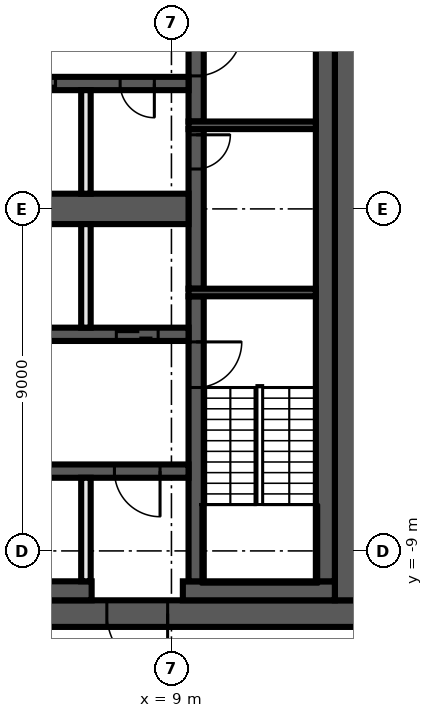
"""IFC4 building model, lengths in metres.
Left out: names, types, materials, properties, quantities, classifications, styles, units other than length and angle.
Written with IfcOpenShell. Run it as: python <this file> out.ifc"""

import sys

from ifc_helpers import new_model, si_unit, direction, frame, frame_2d, origin, place, context, subcontext, project, spatial, rectangle, extrude, element, fill, save


model = new_model("IFC4")
c1 = context("Model", 3, precision=1e-05, world=origin(), true_north=direction((0.0, 1.0)))
c2 = subcontext(c1, "Body", "Model", "MODEL_VIEW")
j1 = project(units=[si_unit("LENGTHUNIT", "METRE"), si_unit("PLANEANGLEUNIT", "RADIAN")], contexts=[c1])
p1 = place(None, origin())
s1 = spatial("IfcSite", under=j1, at=p1, CompositionType="ELEMENT")
p2 = place(p1, origin())
s2 = spatial("IfcBuilding", under=s1, at=p2, CompositionType="ELEMENT")
p3 = place(p2, frame((0.0, 0.0, 245.4)))
s3 = spatial("IfcBuildingStorey", under=s2, at=p3, CompositionType="ELEMENT", Elevation=245.4)
p4 = place(p3, frame((14.0, -10.65, 0.0), z_axis=(0.0, 0.0, 1.0), x_axis=(-1.0, 0.0, 0.0)))
e1 = element("IfcWall", 1, at=p4, inside=s3, PredefinedType="SHEAR", context=c2, shape_type="SweptSolid", body=[
    extrude(rectangle(XDim=28.0, YDim=0.7, at=frame_2d((14.0, 0.0))), origin(), (0.0, 0.0, 1.0), 3.82),
])
p5 = place(p4, frame((5.1, 0.0, 0.0)))
e2 = element("IfcOpeningElement", 2, at=p5, cuts=e1, PredefinedType="OPENING", context=c2, shape_type="SweptSolid", body=[
    extrude(rectangle(XDim=1.6, YDim=2.1, at=frame_2d((0.8, 1.05))), frame((0.0, 0.36, 0.0), z_axis=(0.0, -1.0, 0.0), x_axis=(1.0, 0.0, 0.0)), (0.0, 0.0, 1.0), 0.72),
])
p6 = place(p3, frame((13.65, 10.3, 0.0), z_axis=(0.0, 0.0, 1.0), x_axis=(0.0, -1.0, 0.0)))
e3 = element("IfcWall", 3, at=p6, inside=s3, PredefinedType="SHEAR", context=c2, shape_type="SweptSolid", body=[
    extrude(rectangle(XDim=20.6, YDim=0.7, at=frame_2d((10.3, 0.0))), origin(), (0.0, 0.0, 1.0), 3.82),
])
p7 = place(p3, frame((13.3, -10.05, 0.0), z_axis=(0.0, 0.0, 1.0), x_axis=(-1.0, 0.0, 0.0)))
e4 = element("IfcWall", 4, at=p7, inside=s3, PredefinedType="SHEAR", context=c2, shape_type="SweptSolid", body=[
    extrude(rectangle(XDim=4.0, YDim=0.5, at=frame_2d((2.0, 0.0))), origin(), (0.0, 0.0, 1.0), 3.82),
])
p8 = place(p3, frame((6.9, -10.05, 0.0), z_axis=(0.0, 0.0, 1.0), x_axis=(-1.0, 0.0, 0.0)))
e5 = element("IfcWall", 5, at=p8, inside=s3, PredefinedType="SHEAR", context=c2, shape_type="SweptSolid", body=[
    extrude(rectangle(XDim=20.2, YDim=0.5, at=frame_2d((10.1, 0.0))), origin(), (0.0, 0.0, 1.0), 3.82),
])
p9 = place(p3, frame((13.05, 9.8, 0.0), z_axis=(0.0, 0.0, 1.0), x_axis=(0.0, -1.0, 0.0)))
e6 = element("IfcWall", 6, at=p9, inside=s3, PredefinedType="SHEAR", context=c2, shape_type="SweptSolid", body=[
    extrude(rectangle(XDim=19.6, YDim=0.5, at=frame_2d((9.8, 0.0))), origin(), (0.0, 0.0, 1.0), 3.82),
])
p10 = place(p3, frame((9.65, -2.3, 0.0), z_axis=(0.0, 0.0, 1.0), x_axis=(0.0, -1.0, 0.0)))
e7 = element("IfcWall", 7, at=p10, inside=s3, PredefinedType="SHEAR", context=c2, shape_type="SweptSolid", body=[
    extrude(rectangle(XDim=7.5, YDim=0.4, at=frame_2d((3.75, 0.0))), origin(), (0.0, 0.0, 1.0), 3.82),
])
p11 = place(p10, frame((1.2, 0.0, 0.0)))
e8 = element("IfcOpeningElement", 8, at=p11, cuts=e7, PredefinedType="OPENING", context=c2, shape_type="SweptSolid", body=[
    extrude(rectangle(XDim=1.2, YDim=2.1, at=frame_2d((0.6, 1.05))), frame((0.0, 0.21, 0.0), z_axis=(0.0, -1.0, 0.0), x_axis=(1.0, 0.0, 0.0)), (0.0, 0.0, 1.0), 0.42),
])
p12 = place(p3, frame((9.65, 2.1, 0.0), z_axis=(0.0, 0.0, 1.0), x_axis=(0.0, -1.0, 0.0)))
e9 = element("IfcWall", 9, at=p12, inside=s3, PredefinedType="SHEAR", context=c2, shape_type="SweptSolid", body=[
    extrude(rectangle(XDim=4.2, YDim=0.4, at=frame_2d((2.1, 0.0))), origin(), (0.0, 0.0, 1.0), 3.82),
])
p13 = place(p12, frame((0.15, 0.0, 0.0)))
e10 = element("IfcOpeningElement", 10, at=p13, cuts=e9, PredefinedType="OPENING", context=c2, shape_type="SweptSolid", body=[
    extrude(rectangle(XDim=0.9, YDim=2.1, at=frame_2d((0.45, 1.05))), frame((0.0, 0.21, 0.0), z_axis=(0.0, -1.0, 0.0), x_axis=(1.0, 0.0, 0.0)), (0.0, 0.0, 1.0), 0.42),
])
p14 = place(p3, frame((9.65, 9.8, 0.0), z_axis=(0.0, 0.0, 1.0), x_axis=(0.0, -1.0, 0.0)))
e11 = element("IfcWall", 11, at=p14, inside=s3, PredefinedType="SHEAR", context=c2, shape_type="SweptSolid", body=[
    extrude(rectangle(XDim=7.5, YDim=0.4, at=frame_2d((3.75, 0.0))), origin(), (0.0, 0.0, 1.0), 3.82),
])
p15 = place(p14, frame((5.1, 0.0, 0.0)))
e12 = element("IfcOpeningElement", 12, at=p15, cuts=e11, PredefinedType="OPENING", context=c2, shape_type="SweptSolid", body=[
    extrude(rectangle(XDim=1.2, YDim=2.1, at=frame_2d((0.6, 1.05))), frame((0.0, 0.21, 0.0), z_axis=(0.0, -1.0, 0.0), x_axis=(1.0, 0.0, 0.0)), (0.0, 0.0, 1.0), 0.42),
])
for number, where, z_axis, x_axis in (
    (13, (9.45, 2.2, 0.0), (0.0, 0.0, 1.0), (1.0, 0.0, 0.0)),
    (14, (9.45, -2.2, 0.0), (0.0, 0.0, 1.0), (1.0, 0.0, 0.0)),
):
    element("IfcWall", number, at=place(p3, frame(where, z_axis=z_axis, x_axis=x_axis)), inside=s3, PredefinedType="SHEAR", context=c2, shape_type="SweptSolid", body=[
        extrude(rectangle(XDim=3.35, YDim=0.2, at=frame_2d((1.675, 0.0))), origin(), (0.0, 0.0, 1.0), 3.82),
    ])
p16 = place(p3, frame((9.45, 3.3, 0.0), z_axis=(0.0, 0.0, 1.0), x_axis=(-1.0, 0.0, 0.0)))
e15 = element("IfcWall", 15, at=p16, inside=s3, PredefinedType="SHEAR", context=c2, shape_type="SweptSolid", body=[
    extrude(rectangle(XDim=18.9, YDim=0.35, at=frame_2d((9.45, 0.0))), origin(), (0.0, 0.0, 1.0), 3.82),
])
p17 = place(p16, frame((6.2, 0.0, 0.0)))
e16 = element("IfcOpeningElement", 16, at=p17, cuts=e15, PredefinedType="OPENING", context=c2, shape_type="SweptSolid", body=[
    extrude(rectangle(XDim=1.1, YDim=2.1, at=frame_2d((0.55, 1.05))), frame((0.0, 0.185, 0.0), z_axis=(0.0, -1.0, 0.0), x_axis=(1.0, 0.0, 0.0)), (0.0, 0.0, 1.0), 0.37),
])
p18 = place(p16, frame((3.5, 0.0, 0.0)))
e17 = element("IfcOpeningElement", 17, at=p18, cuts=e15, PredefinedType="OPENING", context=c2, shape_type="SweptSolid", body=[
    extrude(rectangle(XDim=1.1, YDim=2.1, at=frame_2d((0.55, 1.05))), frame((0.0, 0.185, 0.0), z_axis=(0.0, -1.0, 0.0), x_axis=(1.0, 0.0, 0.0)), (0.0, 0.0, 1.0), 0.37),
])
p19 = place(p16, frame((0.9, 0.0, 0.0)))
e18 = element("IfcOpeningElement", 18, at=p19, cuts=e15, PredefinedType="OPENING", context=c2, shape_type="SweptSolid", body=[
    extrude(rectangle(XDim=0.9, YDim=2.1, at=frame_2d((0.45, 1.05))), frame((0.0, 0.185, 0.0), z_axis=(0.0, -1.0, 0.0), x_axis=(1.0, 0.0, 0.0)), (0.0, 0.0, 1.0), 0.37),
])
p20 = place(p16, frame((15.75, 0.0, 0.0)))
e19 = element("IfcOpeningElement", 19, at=p20, cuts=e15, PredefinedType="OPENING", context=c2, shape_type="SweptSolid", body=[
    extrude(rectangle(XDim=0.9, YDim=2.1, at=frame_2d((0.45, 1.05))), frame((0.0, 0.185, 0.0), z_axis=(0.0, -1.0, 0.0), x_axis=(1.0, 0.0, 0.0)), (0.0, 0.0, 1.0), 0.37),
])
p21 = place(p16, frame((10.35, 0.0, 0.0)))
e20 = element("IfcOpeningElement", 20, at=p21, cuts=e15, PredefinedType="OPENING", context=c2, shape_type="SweptSolid", body=[
    extrude(rectangle(XDim=0.9, YDim=2.1, at=frame_2d((0.45, 1.05))), frame((0.0, 0.185, 0.0), z_axis=(0.0, -1.0, 0.0), x_axis=(1.0, 0.0, 0.0)), (0.0, 0.0, 1.0), 0.37),
])
p22 = place(p3, frame((-9.45, -3.3, 0.0), z_axis=(0.0, 0.0, 1.0), x_axis=(1.0, 0.0, 0.0)))
e21 = element("IfcWall", 21, at=p22, inside=s3, PredefinedType="SHEAR", context=c2, shape_type="SweptSolid", body=[
    extrude(rectangle(XDim=18.9, YDim=0.35, at=frame_2d((9.45, 0.0))), origin(), (0.0, 0.0, 1.0), 3.82),
])
p23 = place(p22, frame((0.8, 0.0, 0.0)))
e22 = element("IfcOpeningElement", 22, at=p23, cuts=e21, PredefinedType="OPENING", context=c2, shape_type="SweptSolid", body=[
    extrude(rectangle(XDim=1.1, YDim=2.1, at=frame_2d((0.55, 1.05))), frame((0.0, 0.185, 0.0), z_axis=(0.0, -1.0, 0.0), x_axis=(1.0, 0.0, 0.0)), (0.0, 0.0, 1.0), 0.37),
])
p24 = place(p22, frame((3.5, 0.0, 0.0)))
e23 = element("IfcOpeningElement", 23, at=p24, cuts=e21, PredefinedType="OPENING", context=c2, shape_type="SweptSolid", body=[
    extrude(rectangle(XDim=1.1, YDim=2.1, at=frame_2d((0.55, 1.05))), frame((0.0, 0.185, 0.0), z_axis=(0.0, -1.0, 0.0), x_axis=(1.0, 0.0, 0.0)), (0.0, 0.0, 1.0), 0.37),
])
p25 = place(p22, frame((6.2, 0.0, 0.0)))
e24 = element("IfcOpeningElement", 24, at=p25, cuts=e21, PredefinedType="OPENING", context=c2, shape_type="SweptSolid", body=[
    extrude(rectangle(XDim=1.1, YDim=2.1, at=frame_2d((0.55, 1.05))), frame((0.0, 0.185, 0.0), z_axis=(0.0, -1.0, 0.0), x_axis=(1.0, 0.0, 0.0)), (0.0, 0.0, 1.0), 0.37),
])
p26 = place(p22, frame((8.9, 0.0, 0.0)))
e25 = element("IfcOpeningElement", 25, at=p26, cuts=e21, PredefinedType="OPENING", context=c2, shape_type="SweptSolid", body=[
    extrude(rectangle(XDim=1.1, YDim=2.1, at=frame_2d((0.55, 1.05))), frame((0.0, 0.185, 0.0), z_axis=(0.0, -1.0, 0.0), x_axis=(1.0, 0.0, 0.0)), (0.0, 0.0, 1.0), 0.37),
])
p27 = place(p22, frame((17.0, 0.0, 0.0)))
e26 = element("IfcOpeningElement", 26, at=p27, cuts=e21, PredefinedType="OPENING", context=c2, shape_type="SweptSolid", body=[
    extrude(rectangle(XDim=1.1, YDim=2.1, at=frame_2d((0.55, 1.05))), frame((0.0, 0.185, 0.0), z_axis=(0.0, -1.0, 0.0), x_axis=(1.0, 0.0, 0.0)), (0.0, 0.0, 1.0), 0.37),
])
p28 = place(p22, frame((13.05, 0.0, 0.0)))
e27 = element("IfcOpeningElement", 27, at=p28, cuts=e21, PredefinedType="OPENING", context=c2, shape_type="SweptSolid", body=[
    extrude(rectangle(XDim=0.9, YDim=2.1, at=frame_2d((0.45, 1.05))), frame((0.0, 0.185, 0.0), z_axis=(0.0, -1.0, 0.0), x_axis=(1.0, 0.0, 0.0)), (0.0, 0.0, 1.0), 0.37),
])
p29 = place(p3, frame((9.45, -6.9, 0.0), z_axis=(0.0, 0.0, 1.0), x_axis=(-1.0, 0.0, 0.0)))
e28 = element("IfcWall", 28, at=p29, inside=s3, PredefinedType="SHEAR", context=c2, shape_type="SweptSolid", body=[
    extrude(rectangle(XDim=18.9, YDim=0.35, at=frame_2d((9.45, 0.0))), origin(), (0.0, 0.0, 1.0), 3.82),
])
p30 = place(p29, frame((0.75, 0.0, 0.0)))
e29 = element("IfcOpeningElement", 29, at=p30, cuts=e28, PredefinedType="OPENING", context=c2, shape_type="SweptSolid", body=[
    extrude(rectangle(XDim=1.2, YDim=2.1, at=frame_2d((0.6, 1.05))), frame((0.0, 0.185, 0.0), z_axis=(0.0, -1.0, 0.0), x_axis=(1.0, 0.0, 0.0)), (0.0, 0.0, 1.0), 0.37),
])
p31 = place(p29, frame((15.75, 0.0, 0.0)))
e30 = element("IfcOpeningElement", 30, at=p31, cuts=e28, PredefinedType="OPENING", context=c2, shape_type="SweptSolid", body=[
    extrude(rectangle(XDim=0.9, YDim=2.1, at=frame_2d((0.45, 1.05))), frame((0.0, 0.185, 0.0), z_axis=(0.0, -1.0, 0.0), x_axis=(1.0, 0.0, 0.0)), (0.0, 0.0, 1.0), 0.37),
])
p32 = place(p29, frame((11.7, 0.0, 0.0)))
e31 = element("IfcOpeningElement", 31, at=p32, cuts=e28, PredefinedType="OPENING", context=c2, shape_type="SweptSolid", body=[
    extrude(rectangle(XDim=0.9, YDim=2.1, at=frame_2d((0.45, 1.05))), frame((0.0, 0.185, 0.0), z_axis=(0.0, -1.0, 0.0), x_axis=(1.0, 0.0, 0.0)), (0.0, 0.0, 1.0), 0.37),
])
p33 = place(p29, frame((9.0, 0.0, 0.0)))
e32 = element("IfcOpeningElement", 32, at=p33, cuts=e28, PredefinedType="OPENING", context=c2, shape_type="SweptSolid", body=[
    extrude(rectangle(XDim=0.9, YDim=2.1, at=frame_2d((0.45, 1.05))), frame((0.0, 0.185, 0.0), z_axis=(0.0, -1.0, 0.0), x_axis=(1.0, 0.0, 0.0)), (0.0, 0.0, 1.0), 0.37),
])
p34 = place(p3, frame((-9.45, 0.0, 0.0), z_axis=(0.0, 0.0, 1.0), x_axis=(1.0, 0.0, 0.0)))
e33 = element("IfcWall", 33, at=p34, inside=s3, PredefinedType="SHEAR", context=c2, shape_type="SweptSolid", body=[
    extrude(rectangle(XDim=18.9, YDim=0.8, at=frame_2d((9.45, 0.0))), origin(), (0.0, 0.0, 1.0), 3.82),
])
for number, where, z_axis, x_axis in (
    (34, (6.75, -9.8, 0.0), (0.0, 0.0, 1.0), (0.0, 1.0, 0.0)),
    (35, (6.75, -3.125, 0.0), (0.0, 0.0, 1.0), (0.0, 1.0, 0.0)),
    (36, (6.75, 0.4, 0.0), (0.0, 0.0, 1.0), (0.0, 1.0, 0.0)),
):
    element("IfcWall", number, at=place(p3, frame(where, z_axis=z_axis, x_axis=x_axis)), inside=s3, PredefinedType="SOLIDWALL", context=c2, shape_type="SweptSolid", body=[
        extrude(rectangle(XDim=2.725, YDim=0.25, at=frame_2d((1.363, 0.0))), origin(), (0.0, 0.0, 1.0), 3.82),
    ])
p35 = place(p13, origin())
e37 = element("IfcDoor", 37, at=p35, inside=s3, OperationType="SINGLE_SWING_RIGHT", PredefinedType="DOOR", context=c2, shape_type="SweptSolid", body=[
    extrude(rectangle(XDim=0.9, YDim=2.1, at=frame_2d((0.45, 1.05))), frame((0.0, 0.025, 0.0), z_axis=(0.0, -1.0, 0.0), x_axis=(1.0, 0.0, 0.0)), (0.0, 0.0, 1.0), 0.05),
])
fill(e10, e37)
p36 = place(p18, origin())
e38 = element("IfcDoor", 38, at=p36, inside=s3, OperationType="DOUBLE_DOOR_SLIDING", PredefinedType="DOOR", context=c2, shape_type="SweptSolid", body=[
    extrude(rectangle(XDim=1.1, YDim=2.1, at=frame_2d((0.55, 1.05))), frame((0.0, 0.025, 0.0), z_axis=(0.0, -1.0, 0.0), x_axis=(1.0, 0.0, 0.0)), (0.0, 0.0, 1.0), 0.05),
])
fill(e17, e38)
p37 = place(p19, origin())
e39 = element("IfcDoor", 39, at=p37, inside=s3, OperationType="SINGLE_SWING_LEFT", PredefinedType="DOOR", context=c2, shape_type="SweptSolid", body=[
    extrude(rectangle(XDim=0.9, YDim=2.1, at=frame_2d((0.45, 1.05))), frame((0.0, 0.025, 0.0), z_axis=(0.0, -1.0, 0.0), x_axis=(1.0, 0.0, 0.0)), (0.0, 0.0, 1.0), 0.05),
])
fill(e18, e39)
p38 = place(p27, origin())
e40 = element("IfcDoor", 40, at=p38, inside=s3, OperationType="DOUBLE_DOOR_SLIDING", PredefinedType="DOOR", context=c2, shape_type="SweptSolid", body=[
    extrude(rectangle(XDim=1.1, YDim=2.1, at=frame_2d((0.55, 1.05))), frame((0.0, 0.025, 0.0), z_axis=(0.0, -1.0, 0.0), x_axis=(1.0, 0.0, 0.0)), (0.0, 0.0, 1.0), 0.05),
])
fill(e26, e40)
p39 = place(p5, origin())
e41 = element("IfcDoor", 41, at=p39, inside=s3, OperationType="DOUBLE_DOOR_SINGLE_SWING", PredefinedType="DOOR", context=c2, shape_type="SweptSolid", body=[
    extrude(rectangle(XDim=1.6, YDim=2.1, at=frame_2d((0.8, 1.05))), frame((0.0, 0.025, 0.0), z_axis=(0.0, -1.0, 0.0), x_axis=(1.0, 0.0, 0.0)), (0.0, 0.0, 1.0), 0.05),
])
fill(e2, e41)
p40 = place(p30, origin())
e42 = element("IfcDoor", 42, at=p40, inside=s3, OperationType="SINGLE_SWING_LEFT", PredefinedType="DOOR", context=c2, shape_type="SweptSolid", body=[
    extrude(rectangle(XDim=1.2, YDim=2.1, at=frame_2d((0.6, 1.05))), frame((0.0, 0.025, 0.0), z_axis=(0.0, -1.0, 0.0), x_axis=(1.0, 0.0, 0.0)), (0.0, 0.0, 1.0), 0.05),
])
fill(e29, e42)
p41 = place(p15, origin())
e43 = element("IfcDoor", 43, at=p41, inside=s3, OperationType="SINGLE_SWING_LEFT", PredefinedType="DOOR", context=c2, shape_type="SweptSolid", body=[
    extrude(rectangle(XDim=1.2, YDim=2.1, at=frame_2d((0.6, 1.05))), frame((0.0, 0.025, 0.0), z_axis=(0.0, -1.0, 0.0), x_axis=(1.0, 0.0, 0.0)), (0.0, 0.0, 1.0), 0.05),
])
fill(e12, e43)
p42 = place(p11, origin())
e44 = element("IfcDoor", 44, at=p42, inside=s3, OperationType="SINGLE_SWING_RIGHT", PredefinedType="DOOR", context=c2, shape_type="SweptSolid", body=[
    extrude(rectangle(XDim=1.2, YDim=2.1, at=frame_2d((0.6, 1.05))), frame((0.0, 0.025, 0.0), z_axis=(0.0, -1.0, 0.0), x_axis=(1.0, 0.0, 0.0)), (0.0, 0.0, 1.0), 0.05),
])
fill(e8, e44)
save(model, sys.argv[1])
